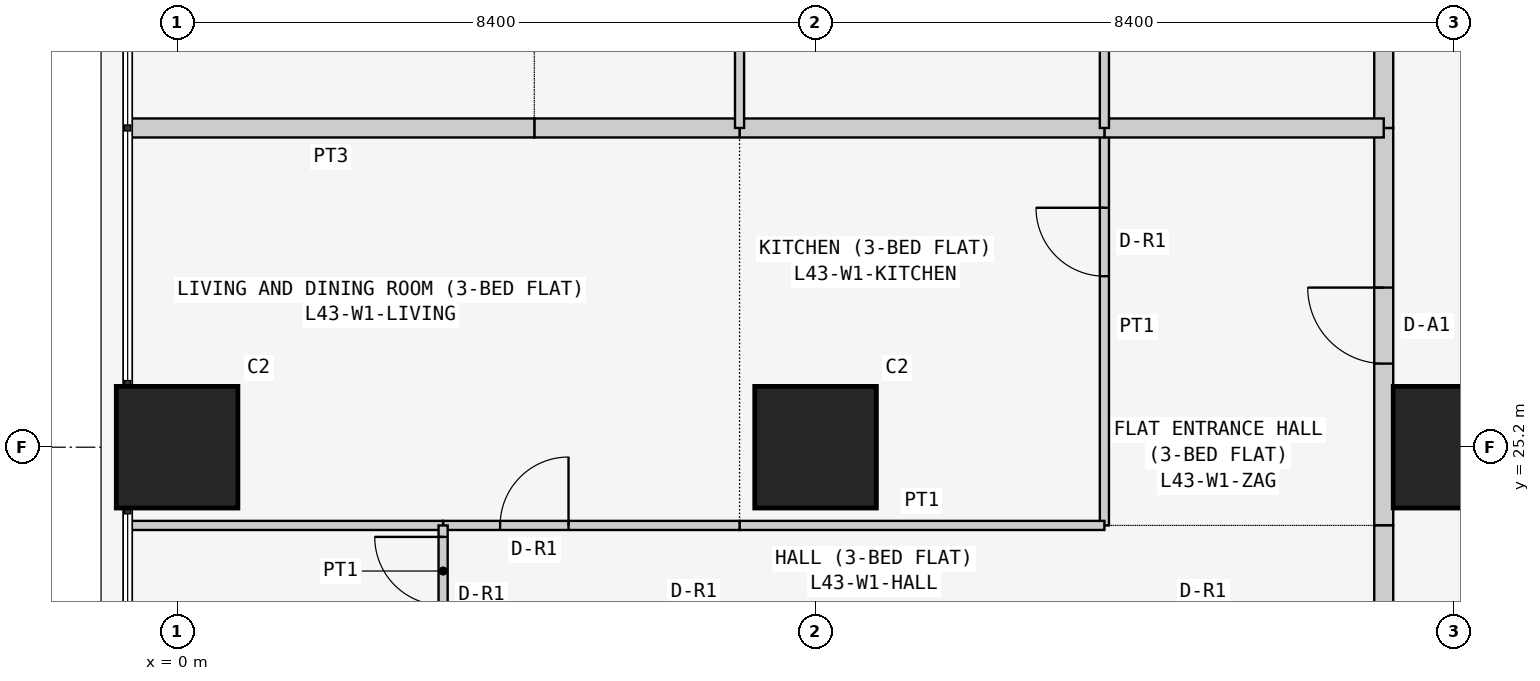
"""IFC4 building model, lengths in metres.
Left out: names, types, materials, properties, quantities, classifications, styles, units other than length and angle.
Written with IfcOpenShell. Run it as: python <this file> out.ifc"""

import sys

from ifc_helpers import new_model, si_unit, direction, frame, frame_2d, origin, origin_2d, place, context, subcontext, project, spatial, rectangle, extrude, element, fill, save


model = new_model("IFC4")
c1 = context("Model", 3, precision=1e-05, world=origin(), true_north=direction((0.0, 1.0)))
c2 = subcontext(c1, "Body", "Model", "MODEL_VIEW")
j1 = project(units=[si_unit("LENGTHUNIT", "METRE"), si_unit("PLANEANGLEUNIT", "RADIAN")], contexts=[c1])
p1 = place(None, origin())
s1 = spatial("IfcSite", under=j1, at=p1, CompositionType="ELEMENT")
p2 = place(p1, origin())
s2 = spatial("IfcBuilding", under=s1, at=p2, CompositionType="ELEMENT")
p3 = place(p2, frame((0.0, 0.0, 166.5)))
s3 = spatial("IfcBuildingStorey", under=s2, at=p3, CompositionType="ELEMENT", Elevation=166.5)
for number, where, z_axis, x_axis in (
    (1, (0.0, 25.2, 0.0), (0.0, 0.0, 1.0), (1.0, 0.0, 0.0)),
    (2, (8.4, 25.2, 0.0), (0.0, 0.0, 1.0), (1.0, 0.0, 0.0)),
    (3, (16.8, 25.2, 0.0), (0.0, 0.0, 1.0), (1.0, 0.0, 0.0)),
):
    element("IfcColumn", number, at=place(p3, frame(where, z_axis=z_axis, x_axis=x_axis)), inside=s3, PredefinedType="COLUMN", context=c2, shape_type="SweptSolid", body=[
        extrude(rectangle(XDim=1.6, YDim=1.6, at=origin_2d()), origin(), (0.0, 0.0, 1.0), 3.6),
    ])
p4 = place(p3, frame((15.875, 24.171, 0.0), z_axis=(0.0, 0.0, 1.0), x_axis=(0.0, 1.0, 0.0)))
e4 = element("IfcWall", 4, at=p4, inside=s3, PredefinedType="PARTITIONING", context=c2, shape_type="SweptSolid", body=[
    extrude(rectangle(XDim=5.229, YDim=0.25, at=frame_2d((2.615, 0.0))), origin(), (0.0, 0.0, 1.0), 3.45),
])
p5 = place(p4, frame((2.129, 0.0, 0.0)))
e5 = element("IfcOpeningElement", 5, at=p5, cuts=e4, PredefinedType="OPENING", context=c2, shape_type="SweptSolid", body=[
    extrude(rectangle(XDim=1.0, YDim=2.1, at=frame_2d((0.5, 1.05))), frame((0.0, 0.135, 0.0), z_axis=(0.0, -1.0, 0.0), x_axis=(1.0, 0.0, 0.0)), (0.0, 0.0, 1.0), 0.27),
])
p6 = place(p3, frame((15.875, 22.971, 0.0), z_axis=(0.0, 0.0, 1.0), x_axis=(0.0, 1.0, 0.0)))
e6 = element("IfcWall", 6, at=p6, inside=s3, PredefinedType="PARTITIONING", context=c2, shape_type="SweptSolid", body=[
    extrude(rectangle(XDim=1.2, YDim=0.25, at=frame_2d((0.6, 0.0))), origin(), (0.0, 0.0, 1.0), 3.45),
])
p7 = place(p3, frame((15.875, 29.4, 0.0), z_axis=(0.0, 0.0, 1.0), x_axis=(0.0, 1.0, 0.0)))
e7 = element("IfcWall", 7, at=p7, inside=s3, PredefinedType="PARTITIONING", context=c2, shape_type="SweptSolid", body=[
    extrude(rectangle(XDim=5.229, YDim=0.25, at=frame_2d((2.615, 0.0))), origin(), (0.0, 0.0, 1.0), 3.45),
])
p8 = place(p7, frame((2.1, 0.0, 0.0)))
e8 = element("IfcOpeningElement", 8, at=p8, cuts=e7, PredefinedType="OPENING", context=c2, shape_type="SweptSolid", body=[
    extrude(rectangle(XDim=1.0, YDim=2.1, at=frame_2d((0.5, 1.05))), frame((0.0, 0.135, 0.0), z_axis=(0.0, -1.0, 0.0), x_axis=(1.0, 0.0, 0.0)), (0.0, 0.0, 1.0), 0.27),
])
p9 = place(p3, frame((12.2, 29.4, 0.0), z_axis=(0.0, 0.0, 1.0), x_axis=(0.0, -1.0, 0.0)))
e9 = element("IfcWall", 9, at=p9, inside=s3, PredefinedType="PARTITIONING", context=c2, shape_type="SweptSolid", body=[
    extrude(rectangle(XDim=5.229, YDim=0.12, at=frame_2d((2.615, 0.0))), origin(), (0.0, 0.0, 1.0), 3.45),
])
p10 = place(p9, frame((1.05, 0.0, 0.0)))
e10 = element("IfcOpeningElement", 10, at=p10, cuts=e9, PredefinedType="OPENING", context=c2, shape_type="SweptSolid", body=[
    extrude(rectangle(XDim=0.9, YDim=2.1, at=frame_2d((0.45, 1.05))), frame((0.0, 0.07, 0.0), z_axis=(0.0, -1.0, 0.0), x_axis=(1.0, 0.0, 0.0)), (0.0, 0.0, 1.0), 0.14),
])
p11 = place(p3, frame((15.875, 29.4, 0.0), z_axis=(0.0, 0.0, 1.0), x_axis=(-1.0, 0.0, 0.0)))
e11 = element("IfcWall", 11, at=p11, inside=s3, PredefinedType="PARTITIONING", context=c2, shape_type="SweptSolid", body=[
    extrude(rectangle(XDim=3.675, YDim=0.25, at=frame_2d((1.837, 0.0))), origin(), (0.0, 0.0, 1.0), 3.45),
])
p12 = place(p3, frame((7.4, 24.171, 0.0), z_axis=(0.0, 0.0, 1.0), x_axis=(1.0, 0.0, 0.0)))
e12 = element("IfcWall", 12, at=p12, inside=s3, PredefinedType="PARTITIONING", context=c2, shape_type="SweptSolid", body=[
    extrude(rectangle(XDim=4.8, YDim=0.12, at=frame_2d((2.4, 0.0))), origin(), (0.0, 0.0, 1.0), 3.45),
])
p13 = place(p3, frame((12.2, 29.4, 0.0), z_axis=(0.0, 0.0, 1.0), x_axis=(-1.0, 0.0, 0.0)))
e13 = element("IfcWall", 13, at=p13, inside=s3, PredefinedType="PARTITIONING", context=c2, shape_type="SweptSolid", body=[
    extrude(rectangle(XDim=4.8, YDim=0.25, at=frame_2d((2.4, 0.0))), origin(), (0.0, 0.0, 1.0), 3.45),
])
p14 = place(p3, frame((3.5, 24.171, 0.0), z_axis=(0.0, 0.0, 1.0), x_axis=(1.0, 0.0, 0.0)))
e14 = element("IfcWall", 14, at=p14, inside=s3, PredefinedType="PARTITIONING", context=c2, shape_type="SweptSolid", body=[
    extrude(rectangle(XDim=3.9, YDim=0.12, at=frame_2d((1.95, 0.0))), origin(), (0.0, 0.0, 1.0), 3.45),
])
p15 = place(p14, frame((0.75, 0.0, 0.0)))
e15 = element("IfcOpeningElement", 15, at=p15, cuts=e14, PredefinedType="OPENING", context=c2, shape_type="SweptSolid", body=[
    extrude(rectangle(XDim=0.9, YDim=2.1, at=frame_2d((0.45, 1.05))), frame((0.0, 0.07, 0.0), z_axis=(0.0, -1.0, 0.0), x_axis=(1.0, 0.0, 0.0)), (0.0, 0.0, 1.0), 0.14),
])
p16 = place(p3, frame((-0.65, 24.171, 0.0), z_axis=(0.0, 0.0, 1.0), x_axis=(1.0, 0.0, 0.0)))
e16 = element("IfcWall", 16, at=p16, inside=s3, PredefinedType="PARTITIONING", context=c2, shape_type="SweptSolid", body=[
    extrude(rectangle(XDim=4.15, YDim=0.12, at=frame_2d((2.075, 0.0))), origin(), (0.0, 0.0, 1.0), 3.45),
])
p17 = place(p3, frame((7.4, 29.4, 0.0), z_axis=(0.0, 0.0, 1.0), x_axis=(-1.0, 0.0, 0.0)))
e17 = element("IfcWall", 17, at=p17, inside=s3, PredefinedType="PARTITIONING", context=c2, shape_type="SweptSolid", body=[
    extrude(rectangle(XDim=2.7, YDim=0.25, at=frame_2d((1.35, 0.0))), origin(), (0.0, 0.0, 1.0), 3.45),
])
p18 = place(p3, frame((4.7, 29.4, 0.0), z_axis=(0.0, 0.0, 1.0), x_axis=(-1.0, 0.0, 0.0)))
e18 = element("IfcWall", 18, at=p18, inside=s3, PredefinedType="PARTITIONING", context=c2, shape_type="SweptSolid", body=[
    extrude(rectangle(XDim=5.35, YDim=0.25, at=frame_2d((2.675, 0.0))), origin(), (0.0, 0.0, 1.0), 3.45),
])
p19 = place(p3, frame((3.5, 24.171, 0.0), z_axis=(0.0, 0.0, 1.0), x_axis=(0.0, -1.0, 0.0)))
e19 = element("IfcWall", 19, at=p19, inside=s3, PredefinedType="PARTITIONING", context=c2, shape_type="SweptSolid", body=[
    extrude(rectangle(XDim=1.2, YDim=0.12, at=frame_2d((0.6, 0.0))), origin(), (0.0, 0.0, 1.0), 3.45),
])
p20 = place(p19, frame((0.151, 0.0, 0.0)))
e20 = element("IfcOpeningElement", 20, at=p20, cuts=e19, PredefinedType="OPENING", context=c2, shape_type="SweptSolid", body=[
    extrude(rectangle(XDim=0.9, YDim=2.1, at=frame_2d((0.45, 1.05))), frame((0.0, 0.07, 0.0), z_axis=(0.0, -1.0, 0.0), x_axis=(1.0, 0.0, 0.0)), (0.0, 0.0, 1.0), 0.14),
])
for number, where, z_axis, x_axis in (
    (21, (12.2, 29.4, 0.0), (0.0, 0.0, 1.0), (0.0, 1.0, 0.0)),
    (22, (7.4, 29.4, 0.0), (0.0, 0.0, 1.0), (0.0, 1.0, 0.0)),
):
    element("IfcWall", number, at=place(p3, frame(where, z_axis=z_axis, x_axis=x_axis)), inside=s3, PredefinedType="PARTITIONING", context=c2, shape_type="SweptSolid", body=[
        extrude(rectangle(XDim=5.229, YDim=0.12, at=frame_2d((2.615, 0.0))), origin(), (0.0, 0.0, 1.0), 3.45),
    ])
p21 = place(p5, origin())
e23 = element("IfcDoor", 23, at=p21, inside=s3, OperationType="SINGLE_SWING_RIGHT", PredefinedType="DOOR", context=c2, shape_type="SweptSolid", body=[
    extrude(rectangle(XDim=1.0, YDim=2.1, at=frame_2d((0.5, 1.05))), frame((0.0, 0.025, 0.0), z_axis=(0.0, -1.0, 0.0), x_axis=(1.0, 0.0, 0.0)), (0.0, 0.0, 1.0), 0.05),
])
fill(e5, e23)
p22 = place(p10, frame((0.9, 0.0, 0.0), z_axis=(0.0, 0.0, 1.0), x_axis=(-1.0, 0.0, 0.0)))
e24 = element("IfcDoor", 24, at=p22, inside=s3, OperationType="SINGLE_SWING_RIGHT", PredefinedType="DOOR", context=c2, shape_type="SweptSolid", body=[
    extrude(rectangle(XDim=0.9, YDim=2.1, at=frame_2d((0.45, 1.05))), frame((0.0, 0.025, 0.0), z_axis=(0.0, -1.0, 0.0), x_axis=(1.0, 0.0, 0.0)), (0.0, 0.0, 1.0), 0.05),
])
fill(e10, e24)
p23 = place(p15, origin())
e25 = element("IfcDoor", 25, at=p23, inside=s3, OperationType="SINGLE_SWING_RIGHT", PredefinedType="DOOR", context=c2, shape_type="SweptSolid", body=[
    extrude(rectangle(XDim=0.9, YDim=2.1, at=frame_2d((0.45, 1.05))), frame((0.0, 0.025, 0.0), z_axis=(0.0, -1.0, 0.0), x_axis=(1.0, 0.0, 0.0)), (0.0, 0.0, 1.0), 0.05),
])
fill(e15, e25)
p24 = place(p20, frame((0.9, 0.0, 0.0), z_axis=(0.0, 0.0, 1.0), x_axis=(-1.0, 0.0, 0.0)))
e26 = element("IfcDoor", 26, at=p24, inside=s3, OperationType="SINGLE_SWING_RIGHT", PredefinedType="DOOR", context=c2, shape_type="SweptSolid", body=[
    extrude(rectangle(XDim=0.9, YDim=2.1, at=frame_2d((0.45, 1.05))), frame((0.0, 0.025, 0.0), z_axis=(0.0, -1.0, 0.0), x_axis=(1.0, 0.0, 0.0)), (0.0, 0.0, 1.0), 0.05),
])
fill(e20, e26)
save(model, sys.argv[1])
